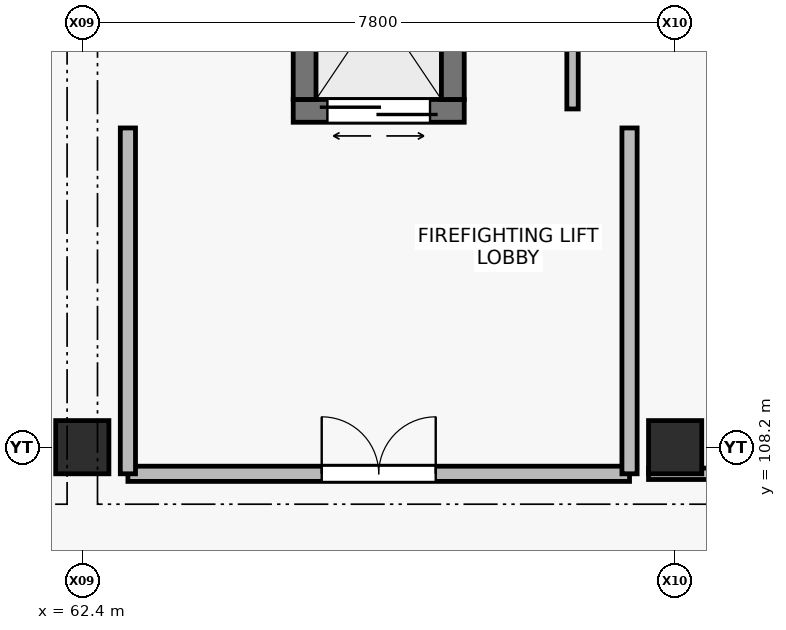
"""IFC4 building model, lengths in metres.
Left out: names, types, materials, properties, quantities, classifications, styles, units other than length and angle.
Written with IfcOpenShell. Run it as: python <this file> out.ifc"""

import sys

from ifc_helpers import new_model, si_unit, direction, frame, frame_2d, origin, origin_2d, place, context, subcontext, project, spatial, rectangle, extrude, element, fill, save


model = new_model("IFC4")
c1 = context("Model", 3, precision=1e-05, world=origin(), true_north=direction((0.0, 1.0)))
c2 = subcontext(c1, "Body", "Model", "MODEL_VIEW")
j1 = project(units=[si_unit("LENGTHUNIT", "METRE"), si_unit("PLANEANGLEUNIT", "RADIAN")], contexts=[c1])
p1 = place(None, origin())
s1 = spatial("IfcSite", under=j1, at=p1, CompositionType="ELEMENT")
p2 = place(p1, origin())
s2 = spatial("IfcBuilding", under=s1, at=p2, CompositionType="ELEMENT")
p3 = place(p2, frame((0.0, 0.0, -4.5)))
s3 = spatial("IfcBuildingStorey", under=s2, at=p3, CompositionType="ELEMENT", Elevation=-4.5)
for number, where, z_axis, x_axis in (
    (1, (62.4, 108.2, 0.0), (0.0, 0.0, 1.0), (1.0, 0.0, 0.0)),
    (2, (70.2, 108.2, 0.0), (0.0, 0.0, 1.0), (1.0, 0.0, 0.0)),
):
    element("IfcColumn", number, at=place(p3, frame(where, z_axis=z_axis, x_axis=x_axis)), inside=s3, PredefinedType="COLUMN", context=c2, shape_type="SweptSolid", body=[
        extrude(rectangle(XDim=0.7, YDim=0.7, at=origin_2d()), origin(), (0.0, 0.0, 1.0), 4.5),
    ])
p4 = place(p3, frame((65.175, 112.625, 0.0), z_axis=(0.0, 0.0, 1.0), x_axis=(1.0, 0.0, 0.0)))
e3 = element("IfcWall", 3, at=p4, inside=s3, PredefinedType="SHEAR", context=c2, shape_type="SweptSolid", body=[
    extrude(rectangle(XDim=2.25, YDim=0.3, at=frame_2d((1.125, 0.0))), origin(), (0.0, 0.0, 1.0), 4.2),
])
p5 = place(p4, frame((0.45, 0.0, 0.0)))
e4 = element("IfcOpeningElement", 4, at=p5, cuts=e3, PredefinedType="OPENING", context=c2, shape_type="SweptSolid", body=[
    extrude(rectangle(XDim=1.35, YDim=2.3, at=frame_2d((0.675, 1.15))), frame((0.0, 0.16, 0.0), z_axis=(0.0, -1.0, 0.0), x_axis=(1.0, 0.0, 0.0)), (0.0, 0.0, 1.0), 0.32),
])
for number, where, z_axis, x_axis in (
    (5, (65.325, 115.225, 0.0), (0.0, 0.0, 1.0), (0.0, -1.0, 0.0)),
    (6, (67.275, 112.775, 0.0), (0.0, 0.0, 1.0), (0.0, 1.0, 0.0)),
):
    element("IfcWall", number, at=place(p3, frame(where, z_axis=z_axis, x_axis=x_axis)), inside=s3, PredefinedType="SHEAR", context=c2, shape_type="SweptSolid", body=[
        extrude(rectangle(XDim=2.45, YDim=0.3, at=frame_2d((1.225, 0.0))), origin(), (0.0, 0.0, 1.0), 4.2),
    ])
p6 = place(p3, frame((63.0, 107.85, 0.0), z_axis=(0.0, 0.0, 1.0), x_axis=(1.0, 0.0, 0.0)))
e7 = element("IfcWall", 7, at=p6, inside=s3, PredefinedType="SOLIDWALL", context=c2, shape_type="SweptSolid", body=[
    extrude(rectangle(XDim=6.6, YDim=0.2, at=frame_2d((3.3, 0.0))), origin(), (0.0, 0.0, 1.0), 3.71),
])
p7 = place(p6, frame((2.55, 0.0, 0.0)))
e8 = element("IfcOpeningElement", 8, at=p7, cuts=e7, PredefinedType="OPENING", context=c2, shape_type="SweptSolid", body=[
    extrude(rectangle(XDim=1.5, YDim=2.2, at=frame_2d((0.75, 1.1))), frame((0.0, 0.11, 0.0), z_axis=(0.0, -1.0, 0.0), x_axis=(1.0, 0.0, 0.0)), (0.0, 0.0, 1.0), 0.22),
])
for number, where, z_axis, x_axis in (
    (9, (63.0, 112.4, 0.0), (0.0, 0.0, 1.0), (0.0, -1.0, 0.0)),
    (10, (69.6, 107.85, 0.0), (0.0, 0.0, 1.0), (0.0, 1.0, 0.0)),
):
    element("IfcWall", number, at=place(p3, frame(where, z_axis=z_axis, x_axis=x_axis)), inside=s3, PredefinedType="SOLIDWALL", context=c2, shape_type="SweptSolid", body=[
        extrude(rectangle(XDim=4.55, YDim=0.2, at=frame_2d((2.275, 0.0))), origin(), (0.0, 0.0, 1.0), 4.2),
    ])
p8 = place(p3, frame((69.85, 107.85, 0.0), z_axis=(0.0, 0.0, 1.0), x_axis=(1.0, 0.0, 0.0)))
e11 = element("IfcWall", 11, at=p8, inside=s3, PredefinedType="PARTITIONING", context=c2, shape_type="SweptSolid", body=[
    extrude(rectangle(XDim=2.85, YDim=0.15, at=frame_2d((1.425, 0.0))), origin(), (0.0, 0.0, 1.0), 3.71),
])
p9 = place(p8, frame((1.377, 0.0, 0.0)))
e12 = element("IfcOpeningElement", 12, at=p9, cuts=e11, PredefinedType="OPENING", context=c2, shape_type="SweptSolid", body=[
    extrude(rectangle(XDim=0.95, YDim=2.1, at=frame_2d((0.475, 1.05))), frame((0.0, 0.085, 0.0), z_axis=(0.0, -1.0, 0.0), x_axis=(1.0, 0.0, 0.0)), (0.0, 0.0, 1.0), 0.17),
])
p10 = place(p3, frame((68.85, 112.65, 0.0), z_axis=(0.0, 0.0, 1.0), x_axis=(0.0, 1.0, 0.0)))
e13 = element("IfcWall", 13, at=p10, inside=s3, PredefinedType="PARTITIONING", context=c2, shape_type="SweptSolid", body=[
    extrude(rectangle(XDim=3.1, YDim=0.15, at=frame_2d((1.55, 0.0))), origin(), (0.0, 0.0, 1.0), 4.2),
])
p11 = place(p5, origin())
e14 = element("IfcDoor", 14, at=p11, inside=s3, OperationType="DOUBLE_DOOR_SLIDING", PredefinedType="DOOR", context=c2, shape_type="SweptSolid", body=[
    extrude(rectangle(XDim=1.35, YDim=2.3, at=frame_2d((0.675, 1.15))), frame((0.0, 0.025, 0.0), z_axis=(0.0, -1.0, 0.0), x_axis=(1.0, 0.0, 0.0)), (0.0, 0.0, 1.0), 0.05),
])
fill(e4, e14)
p12 = place(p7, origin())
e15 = element("IfcDoor", 15, at=p12, inside=s3, OperationType="DOUBLE_DOOR_SINGLE_SWING", PredefinedType="DOOR", context=c2, shape_type="SweptSolid", body=[
    extrude(rectangle(XDim=1.5, YDim=2.2, at=frame_2d((0.75, 1.1))), frame((0.0, 0.025, 0.0), z_axis=(0.0, -1.0, 0.0), x_axis=(1.0, 0.0, 0.0)), (0.0, 0.0, 1.0), 0.05),
])
fill(e8, e15)
save(model, sys.argv[1])
